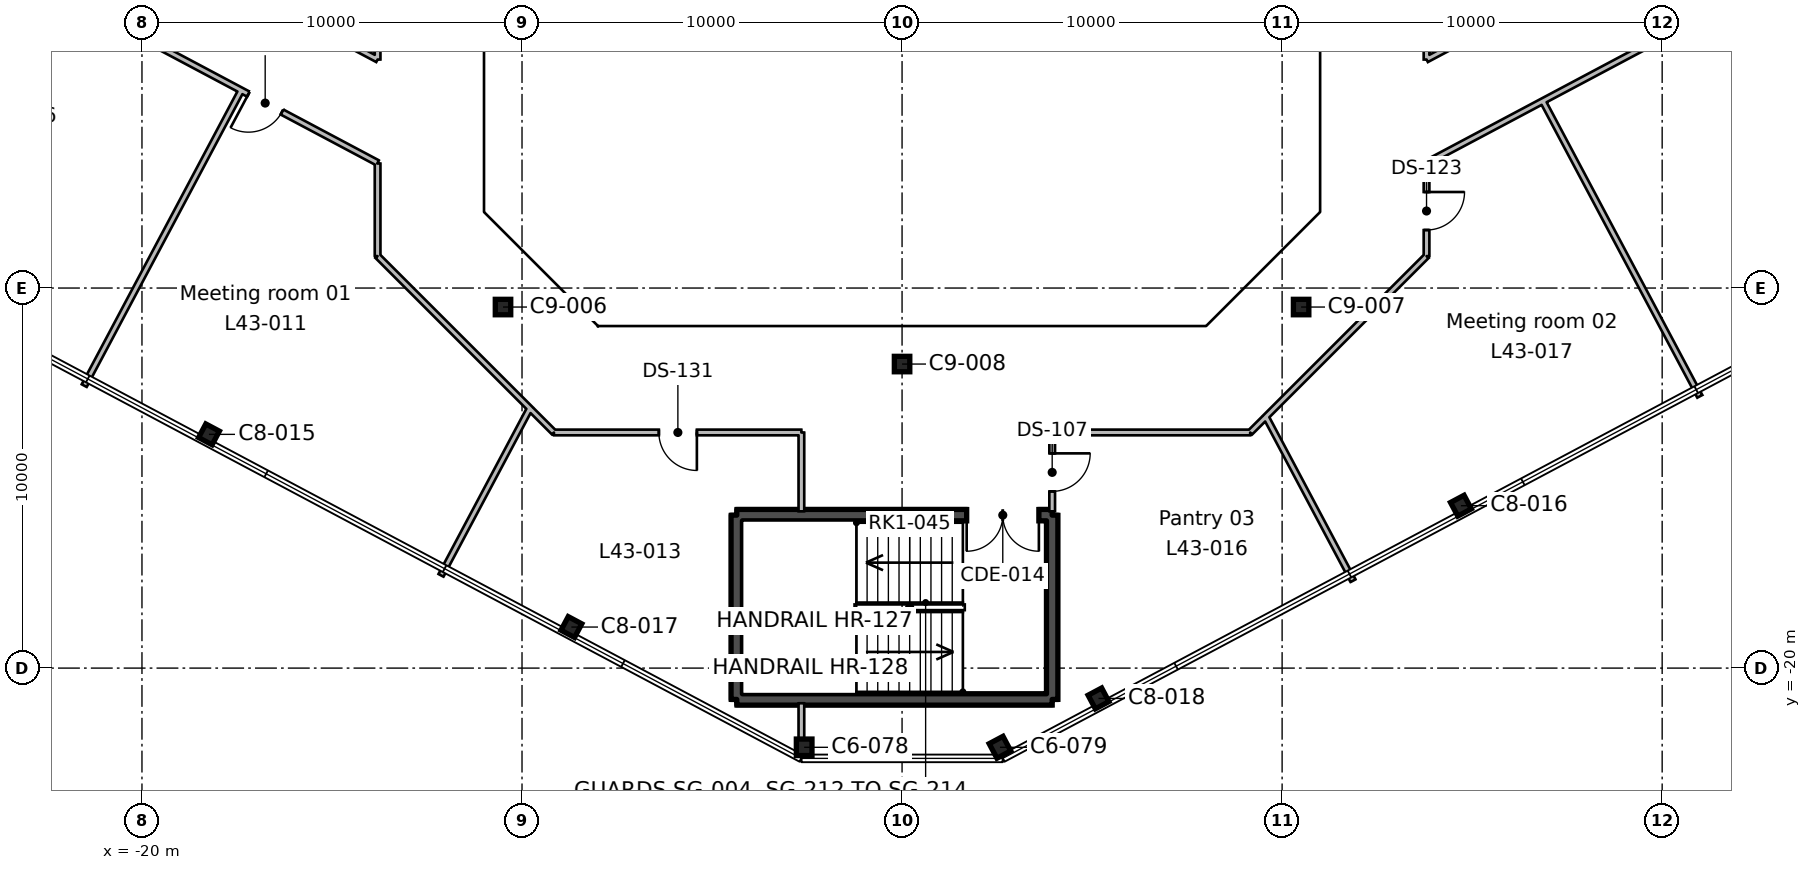
"""IFC4 building model, lengths in metres.
Left out: names, types, materials, properties, quantities, classifications, styles, units other than length and angle.
Written with IfcOpenShell. Run it as: python <this file> out.ifc"""

import sys

from ifc_helpers import new_model, si_unit, direction, frame, frame_2d, origin, origin_2d, place, context, subcontext, project, spatial, rectangle, hollow_rectangle, i_section, extrude, element, fill, save


model = new_model("IFC4")
c1 = context("Model", 3, precision=1e-05, world=origin(), true_north=direction((0.0, 1.0)))
c2 = subcontext(c1, "Body", "Model", "MODEL_VIEW")
j1 = project(units=[si_unit("LENGTHUNIT", "METRE"), si_unit("PLANEANGLEUNIT", "RADIAN")], contexts=[c1])
p1 = place(None, origin())
s1 = spatial("IfcSite", under=j1, at=p1, CompositionType="ELEMENT")
p2 = place(p1, origin())
s2 = spatial("IfcBuilding", under=s1, at=p2, CompositionType="ELEMENT")
p3 = place(p2, frame((0.0, 0.0, 201.3)))
s3 = spatial("IfcBuildingStorey", under=s2, at=p3, CompositionType="ELEMENT", Elevation=201.3)
for number, where, z_axis, x_axis in (
    (1, (-2.576, -22.084, 0.0), (0.0, 0.0, 1.0), (1.0, 0.0, 0.0)),
    (2, (2.576, -22.084, 0.0), (0.0, 0.0, 1.0), (0.883, 0.469, 0.0)),
):
    element("IfcColumn", number, at=place(p3, frame(where, z_axis=z_axis, x_axis=x_axis)), inside=s3, PredefinedType="COLUMN", context=c2, shape_type="SweptSolid", body=[
        extrude(i_section(OverallWidth=0.412, OverallDepth=0.434, WebThickness=0.036, FlangeThickness=0.057, FilletRadius=0.015, at=origin_2d()), origin(), (0.0, 0.0, 1.0), 3.9),
    ])
for number, where, z_axis, x_axis in (
    (3, (5.169, -20.798, 0.0), (0.0, 0.0, 1.0), (0.883, 0.469, 0.0)),
    (4, (-8.701, -18.92, 0.0), (0.0, 0.0, 1.0), (0.883, -0.469, 0.0)),
    (5, (14.705, -15.727, 0.0), (0.0, 0.0, 1.0), (0.883, 0.469, 0.0)),
    (6, (-18.237, -13.85, 0.0), (0.0, 0.0, 1.0), (0.883, -0.469, 0.0)),
):
    element("IfcColumn", number, at=place(p3, frame(where, z_axis=z_axis, x_axis=x_axis)), inside=s3, PredefinedType="COLUMN", context=c2, shape_type="SweptSolid", body=[
        extrude(i_section(OverallWidth=0.404, OverallDepth=0.406, WebThickness=0.027, FlangeThickness=0.044, FilletRadius=0.015, at=origin_2d()), origin(), (0.0, 0.0, 1.0), 3.9),
    ])
for number, where, z_axis, x_axis in (
    (7, (0.0, -12.0, 0.0), (0.0, 0.0, 1.0), (1.0, 0.0, 0.0)),
    (8, (-10.5, -10.5, 0.0), (0.0, 0.0, 1.0), (1.0, 0.0, 0.0)),
    (9, (10.5, -10.5, 0.0), (0.0, 0.0, 1.0), (1.0, 0.0, 0.0)),
):
    element("IfcColumn", number, at=place(p3, frame(where, z_axis=z_axis, x_axis=x_axis)), inside=s3, PredefinedType="COLUMN", context=c2, shape_type="SweptSolid", body=[
        extrude(hollow_rectangle(XDim=0.406, YDim=0.406, WallThickness=0.015, InnerFilletRadius=0.007, OuterFilletRadius=0.022, at=origin_2d()), origin(), (0.0, 0.0, 1.0), 3.9),
    ])
p4 = place(p3, frame((3.95, -15.975, 0.0), z_axis=(0.0, 0.0, 1.0), x_axis=(0.0, -1.0, 0.0)))
e10 = element("IfcWall", 10, at=p4, inside=s3, PredefinedType="SHEAR", context=c2, shape_type="SweptSolid", body=[
    extrude(rectangle(XDim=4.85, YDim=0.3, at=frame_2d((2.425, 0.0))), origin(), (0.0, 0.0, 1.0), 3.9),
])
p5 = place(p3, frame((3.95, -20.825, 0.0), z_axis=(0.0, 0.0, 1.0), x_axis=(-1.0, 0.0, 0.0)))
e11 = element("IfcWall", 11, at=p5, inside=s3, PredefinedType="SHEAR", context=c2, shape_type="SweptSolid", body=[
    extrude(rectangle(XDim=8.3, YDim=0.3, at=frame_2d((4.15, 0.0))), origin(), (0.0, 0.0, 1.0), 3.9),
])
p6 = place(p3, frame((-4.35, -20.825, 0.0), z_axis=(0.0, 0.0, 1.0), x_axis=(0.0, 1.0, 0.0)))
e12 = element("IfcWall", 12, at=p6, inside=s3, PredefinedType="SHEAR", context=c2, shape_type="SweptSolid", body=[
    extrude(rectangle(XDim=4.85, YDim=0.3, at=frame_2d((2.425, 0.0))), origin(), (0.0, 0.0, 1.0), 3.9),
])
p7 = place(p3, frame((-4.35, -15.975, 0.0), z_axis=(0.0, 0.0, 1.0), x_axis=(1.0, 0.0, 0.0)))
e13 = element("IfcWall", 13, at=p7, inside=s3, PredefinedType="SHEAR", context=c2, shape_type="SweptSolid", body=[
    extrude(rectangle(XDim=8.3, YDim=0.3, at=frame_2d((4.15, 0.0))), origin(), (0.0, 0.0, 1.0), 3.9),
])
p8 = place(p7, frame((6.05, 0.0, 0.0)))
e14 = element("IfcOpeningElement", 14, at=p8, cuts=e13, PredefinedType="OPENING", context=c2, shape_type="SweptSolid", body=[
    extrude(rectangle(XDim=1.9, YDim=2.1, at=frame_2d((0.95, 1.05))), frame((0.0, 0.16, 0.0), z_axis=(0.0, -1.0, 0.0), x_axis=(1.0, 0.0, 0.0)), (0.0, 0.0, 1.0), 0.32),
])
p9 = place(p3, frame((-13.8, -6.706, 0.0), z_axis=(0.0, 0.0, 1.0), x_axis=(-0.882947286887, 0.469472138235, 0.0)))
e15 = element("IfcWall", 15, at=p9, inside=s3, PredefinedType="PARTITIONING", context=c2, shape_type="SweptSolid", body=[
    extrude(rectangle(XDim=36.571, YDim=0.15, at=frame_2d((18.285, 0.0))), origin(), (0.0, 0.0, 1.0), 3.54),
])
p10 = place(p9, frame((34.15, 0.0, 0.0)))
e16 = element("IfcOpeningElement", 16, at=p10, cuts=e15, PredefinedType="OPENING", context=c2, shape_type="SweptSolid", body=[
    extrude(rectangle(XDim=1.0, YDim=2.1, at=frame_2d((0.5, 1.05))), frame((0.0, 0.085, 0.0), z_axis=(0.0, -1.0, 0.0), x_axis=(1.0, 0.0, 0.0)), (0.0, 0.0, 1.0), 0.17),
])
p11 = place(p9, frame((17.75, 0.0, 0.0)))
e17 = element("IfcOpeningElement", 17, at=p11, cuts=e15, PredefinedType="OPENING", context=c2, shape_type="SweptSolid", body=[
    extrude(rectangle(XDim=1.0, YDim=2.1, at=frame_2d((0.5, 1.05))), frame((0.0, 0.085, 0.0), z_axis=(0.0, -1.0, 0.0), x_axis=(1.0, 0.0, 0.0)), (0.0, 0.0, 1.0), 0.17),
])
p12 = place(p9, frame((13.45, 0.0, 0.0)))
e18 = element("IfcOpeningElement", 18, at=p12, cuts=e15, PredefinedType="OPENING", context=c2, shape_type="SweptSolid", body=[
    extrude(rectangle(XDim=1.0, YDim=2.1, at=frame_2d((0.5, 1.05))), frame((0.0, 0.085, 0.0), z_axis=(0.0, -1.0, 0.0), x_axis=(1.0, 0.0, 0.0)), (0.0, 0.0, 1.0), 0.17),
])
p13 = place(p9, frame((2.85, 0.0, 0.0)))
e19 = element("IfcOpeningElement", 19, at=p13, cuts=e15, PredefinedType="OPENING", context=c2, shape_type="SweptSolid", body=[
    extrude(rectangle(XDim=1.0, YDim=2.1, at=frame_2d((0.5, 1.05))), frame((0.0, 0.085, 0.0), z_axis=(0.0, -1.0, 0.0), x_axis=(1.0, 0.0, 0.0)), (0.0, 0.0, 1.0), 0.17),
])
p14 = place(p3, frame((-17.388, -4.798, 0.0), z_axis=(0.0, 0.0, 1.0), x_axis=(-0.469532456729, -0.882915212281, 0.0)))
e20 = element("IfcWall", 20, at=p14, inside=s3, PredefinedType="PARTITIONING", context=c2, shape_type="SweptSolid", body=[
    extrude(rectangle(XDim=8.8, YDim=0.15, at=frame_2d((4.4, 0.0))), origin(), (0.0, 0.0, 1.0), 3.54),
])
p15 = place(p3, frame((-9.759, -13.2, 0.0), z_axis=(0.0, 0.0, 1.0), x_axis=(-0.707192226993, 0.707021325053, 0.0)))
e21 = element("IfcWall", 21, at=p15, inside=s3, PredefinedType="PARTITIONING", context=c2, shape_type="SweptSolid", body=[
    extrude(rectangle(XDim=5.714, YDim=0.15, at=frame_2d((2.857, 0.0))), origin(), (0.0, 0.0, 1.0), 3.54),
])
p16 = place(p3, frame((-13.8, -9.16, 0.0), z_axis=(0.0, 0.0, 1.0), x_axis=(0.0, 1.0, 0.0)))
e22 = element("IfcWall", 22, at=p16, inside=s3, PredefinedType="PARTITIONING", context=c2, shape_type="SweptSolid", body=[
    extrude(rectangle(XDim=2.437, YDim=0.15, at=frame_2d((1.219, 0.0))), origin(), (0.0, 0.0, 1.0), 3.54),
])
p17 = place(p3, frame((-9.794, -13.165, 0.0), z_axis=(0.0, 0.0, 1.0), x_axis=(-0.469669090987, -0.882842536906, 0.0)))
e23 = element("IfcWall", 23, at=p17, inside=s3, PredefinedType="PARTITIONING", context=c2, shape_type="SweptSolid", body=[
    extrude(rectangle(XDim=4.978, YDim=0.15, at=frame_2d((2.489, 0.0))), origin(), (0.0, 0.0, 1.0), 3.54),
])
p18 = place(p3, frame((-2.649, -13.8, 0.0), z_axis=(0.0, 0.0, 1.0), x_axis=(-1.0, 0.0, 0.0)))
e24 = element("IfcWall", 24, at=p18, inside=s3, PredefinedType="PARTITIONING", context=c2, shape_type="SweptSolid", body=[
    extrude(rectangle(XDim=6.511, YDim=0.15, at=frame_2d((3.255, 0.0))), origin(), (0.0, 0.0, 1.0), 3.54),
])
p19 = place(p18, frame((2.75, 0.0, 0.0)))
e25 = element("IfcOpeningElement", 25, at=p19, cuts=e24, PredefinedType="OPENING", context=c2, shape_type="SweptSolid", body=[
    extrude(rectangle(XDim=1.0, YDim=2.1, at=frame_2d((0.5, 1.05))), frame((0.0, 0.085, 0.0), z_axis=(0.0, -1.0, 0.0), x_axis=(1.0, 0.0, 0.0)), (0.0, 0.0, 1.0), 0.17),
])
p20 = place(p3, frame((-9.791, -13.169, 0.0), z_axis=(0.0, 0.0, 1.0), x_axis=(0.707653231313, -0.706559908438, 0.0)))
e26 = element("IfcWall", 26, at=p20, inside=s3, PredefinedType="PARTITIONING", context=c2, shape_type="SweptSolid", body=[
    extrude(rectangle(XDim=0.893, YDim=0.15, at=frame_2d((0.447, 0.0))), origin(), (0.0, 0.0, 1.0), 3.54),
])
p21 = place(p3, frame((-2.649, -13.8, 0.0), z_axis=(0.0, 0.0, 1.0), x_axis=(0.0, -1.0, 0.0)))
e27 = element("IfcWall", 27, at=p21, inside=s3, PredefinedType="PARTITIONING", context=c2, shape_type="SweptSolid", body=[
    extrude(rectangle(XDim=2.075, YDim=0.15, at=frame_2d((1.038, 0.0))), origin(), (0.0, 0.0, 1.0), 3.54),
])
p22 = place(p3, frame((-2.649, -20.925, 0.0), z_axis=(0.0, 0.0, 1.0), x_axis=(0.0, -1.0, 0.0)))
e28 = element("IfcWall", 28, at=p22, inside=s3, PredefinedType="PARTITIONING", context=c2, shape_type="SweptSolid", body=[
    extrude(rectangle(XDim=0.942, YDim=0.15, at=frame_2d((0.471, 0.0))), origin(), (0.0, 0.0, 1.0), 3.54),
])
p23 = place(p3, frame((4.954, -13.8, 0.0), z_axis=(0.0, 0.0, 1.0), x_axis=(-1.0, 0.0, 0.0)))
e29 = element("IfcWall", 29, at=p23, inside=s3, PredefinedType="PARTITIONING", context=c2, shape_type="SweptSolid", body=[
    extrude(rectangle(XDim=1.004, YDim=0.15, at=frame_2d((0.502, 0.0))), origin(), (0.0, 0.0, 1.0), 3.54),
])
p24 = place(p3, frame((3.95, -13.8, 0.0), z_axis=(0.0, 0.0, 1.0), x_axis=(0.0, -1.0, 0.0)))
e30 = element("IfcWall", 30, at=p24, inside=s3, PredefinedType="PARTITIONING", context=c2, shape_type="SweptSolid", body=[
    extrude(rectangle(XDim=2.075, YDim=0.15, at=frame_2d((1.038, 0.0))), origin(), (0.0, 0.0, 1.0), 3.54),
])
p25 = place(p24, frame((0.55, 0.0, 0.0)))
e31 = element("IfcOpeningElement", 31, at=p25, cuts=e30, PredefinedType="OPENING", context=c2, shape_type="SweptSolid", body=[
    extrude(rectangle(XDim=1.0, YDim=2.1, at=frame_2d((0.5, 1.05))), frame((0.0, 0.085, 0.0), z_axis=(0.0, -1.0, 0.0), x_axis=(1.0, 0.0, 0.0)), (0.0, 0.0, 1.0), 0.17),
])
p26 = place(p3, frame((9.16, -13.8, 0.0), z_axis=(0.0, 0.0, 1.0), x_axis=(-1.0, 0.0, 0.0)))
e32 = element("IfcWall", 32, at=p26, inside=s3, PredefinedType="PARTITIONING", context=c2, shape_type="SweptSolid", body=[
    extrude(rectangle(XDim=4.206, YDim=0.15, at=frame_2d((2.103, 0.0))), origin(), (0.0, 0.0, 1.0), 3.54),
])
p27 = place(p3, frame((9.159, -13.8, 0.0), z_axis=(0.0, 0.0, 1.0), x_axis=(0.707945081169, 0.70626748619, 0.0)))
e33 = element("IfcWall", 33, at=p27, inside=s3, PredefinedType="PARTITIONING", context=c2, shape_type="SweptSolid", body=[
    extrude(rectangle(XDim=0.582, YDim=0.15, at=frame_2d((0.291, 0.0))), origin(), (0.0, 0.0, 1.0), 3.54),
])
p28 = place(p3, frame((9.573, -13.387, 0.0), z_axis=(0.0, 0.0, 1.0), x_axis=(0.469342774431, -0.883016058795, 0.0)))
e34 = element("IfcWall", 34, at=p28, inside=s3, PredefinedType="PARTITIONING", context=c2, shape_type="SweptSolid", body=[
    extrude(rectangle(XDim=4.885, YDim=0.15, at=frame_2d((2.443, 0.0))), origin(), (0.0, 0.0, 1.0), 3.54),
])
p29 = place(p3, frame((13.8, -6.723, 0.0), z_axis=(0.0, 0.0, 1.0), x_axis=(0.0, -1.0, 0.0)))
e35 = element("IfcWall", 35, at=p29, inside=s3, PredefinedType="PARTITIONING", context=c2, shape_type="SweptSolid", body=[
    extrude(rectangle(XDim=2.437, YDim=0.15, at=frame_2d((1.219, 0.0))), origin(), (0.0, 0.0, 1.0), 3.54),
])
p30 = place(p29, frame((0.75, 0.0, 0.0)))
e36 = element("IfcOpeningElement", 36, at=p30, cuts=e35, PredefinedType="OPENING", context=c2, shape_type="SweptSolid", body=[
    extrude(rectangle(XDim=1.0, YDim=2.1, at=frame_2d((0.5, 1.05))), frame((0.0, 0.085, 0.0), z_axis=(0.0, -1.0, 0.0), x_axis=(1.0, 0.0, 0.0)), (0.0, 0.0, 1.0), 0.17),
])
p31 = place(p3, frame((13.8, -9.16, 0.0), z_axis=(0.0, 0.0, 1.0), x_axis=(-0.707187736796, -0.707025816307, 0.0)))
e37 = element("IfcWall", 37, at=p31, inside=s3, PredefinedType="PARTITIONING", context=c2, shape_type="SweptSolid", body=[
    extrude(rectangle(XDim=6.031, YDim=0.15, at=frame_2d((3.016, 0.0))), origin(), (0.0, 0.0, 1.0), 3.54),
])
p32 = place(p3, frame((16.859, -5.08, 0.0), z_axis=(0.0, 0.0, 1.0), x_axis=(0.469445946219, -0.882961212952, 0.0)))
e38 = element("IfcWall", 38, at=p32, inside=s3, PredefinedType="PARTITIONING", context=c2, shape_type="SweptSolid", body=[
    extrude(rectangle(XDim=8.8, YDim=0.15, at=frame_2d((4.4, 0.0))), origin(), (0.0, 0.0, 1.0), 3.54),
])
p33 = place(p3, frame((48.38, 11.679, 0.0), z_axis=(0.0, 0.0, 1.0), x_axis=(-0.882962559816, -0.469443412951, 0.0)))
e39 = element("IfcWall", 39, at=p33, inside=s3, PredefinedType="PARTITIONING", context=c2, shape_type="SweptSolid", body=[
    extrude(rectangle(XDim=39.163, YDim=0.15, at=frame_2d((19.582, 0.0))), origin(), (0.0, 0.0, 1.0), 3.54),
])
p34 = place(p33, frame((25.55, 0.0, 0.0)))
e40 = element("IfcOpeningElement", 40, at=p34, cuts=e39, PredefinedType="OPENING", context=c2, shape_type="SweptSolid", body=[
    extrude(rectangle(XDim=1.0, YDim=2.1, at=frame_2d((0.5, 1.05))), frame((0.0, 0.085, 0.0), z_axis=(0.0, -1.0, 0.0), x_axis=(1.0, 0.0, 0.0)), (0.0, 0.0, 1.0), 0.17),
])
p35 = place(p33, frame((20.45, 0.0, 0.0)))
e41 = element("IfcOpeningElement", 41, at=p35, cuts=e39, PredefinedType="OPENING", context=c2, shape_type="SweptSolid", body=[
    extrude(rectangle(XDim=1.0, YDim=2.1, at=frame_2d((0.5, 1.05))), frame((0.0, 0.085, 0.0), z_axis=(0.0, -1.0, 0.0), x_axis=(1.0, 0.0, 0.0)), (0.0, 0.0, 1.0), 0.17),
])
p36 = place(p33, frame((18.75, 0.0, 0.0)))
e42 = element("IfcOpeningElement", 42, at=p36, cuts=e39, PredefinedType="OPENING", context=c2, shape_type="SweptSolid", body=[
    extrude(rectangle(XDim=1.0, YDim=2.1, at=frame_2d((0.5, 1.05))), frame((0.0, 0.085, 0.0), z_axis=(0.0, -1.0, 0.0), x_axis=(1.0, 0.0, 0.0)), (0.0, 0.0, 1.0), 0.17),
])
p37 = place(p3, frame((-13.8, 9.16, 0.0), z_axis=(0.0, 0.0, 1.0), x_axis=(0.0, -1.0, 0.0)))
e43 = element("IfcWall", 43, at=p37, inside=s3, PredefinedType="PARTITIONING", context=c2, shape_type="SweptSolid", body=[
    extrude(rectangle(XDim=13.148, YDim=0.15, at=frame_2d((6.574, 0.0))), origin(), (0.0, 0.0, 1.0), 3.54),
])
p38 = place(p3, frame((-13.8, -3.988, 0.0), z_axis=(0.0, 0.0, 1.0), x_axis=(-0.88294256459, 0.469481019461, 0.0)))
e44 = element("IfcWall", 44, at=p38, inside=s3, PredefinedType="PARTITIONING", context=c2, shape_type="SweptSolid", body=[
    extrude(rectangle(XDim=7.487, YDim=0.15, at=frame_2d((3.744, 0.0))), origin(), (0.0, 0.0, 1.0), 3.54),
])
p39 = place(p3, frame((13.8, 3.441, 0.0), z_axis=(0.0, 0.0, 1.0), x_axis=(0.0, -1.0, 0.0)))
e45 = element("IfcWall", 45, at=p39, inside=s3, PredefinedType="PARTITIONING", context=c2, shape_type="SweptSolid", body=[
    extrude(rectangle(XDim=7.429, YDim=0.15, at=frame_2d((3.714, 0.0))), origin(), (0.0, 0.0, 1.0), 3.54),
])
p40 = place(p3, frame((13.8, -3.988, 0.0), z_axis=(0.0, 0.0, 1.0), x_axis=(0.882958842974, 0.469450403786, 0.0)))
e46 = element("IfcWall", 46, at=p40, inside=s3, PredefinedType="PARTITIONING", context=c2, shape_type="SweptSolid", body=[
    extrude(rectangle(XDim=3.487, YDim=0.15, at=frame_2d((1.744, 0.0))), origin(), (0.0, 0.0, 1.0), 3.54),
])
p41 = place(p8, frame((1.9, 0.0, 0.0), z_axis=(0.0, 0.0, 1.0), x_axis=(-1.0, 0.0, 0.0)))
e47 = element("IfcDoor", 47, at=p41, inside=s3, OperationType="DOUBLE_DOOR_SINGLE_SWING", PredefinedType="DOOR", context=c2, shape_type="SweptSolid", body=[
    extrude(rectangle(XDim=1.9, YDim=2.1, at=frame_2d((0.95, 1.05))), frame((0.0, 0.025, 0.0), z_axis=(0.0, -1.0, 0.0), x_axis=(1.0, 0.0, 0.0)), (0.0, 0.0, 1.0), 0.05),
])
fill(e14, e47)
p42 = place(p25, origin())
e48 = element("IfcDoor", 48, at=p42, inside=s3, OperationType="SINGLE_SWING_LEFT", PredefinedType="DOOR", context=c2, shape_type="SweptSolid", body=[
    extrude(rectangle(XDim=1.0, YDim=2.1, at=frame_2d((0.5, 1.05))), frame((0.0, 0.025, 0.0), z_axis=(0.0, -1.0, 0.0), x_axis=(1.0, 0.0, 0.0)), (0.0, 0.0, 1.0), 0.05),
])
fill(e31, e48)
p43 = place(p30, origin())
e49 = element("IfcDoor", 49, at=p43, inside=s3, OperationType="SINGLE_SWING_LEFT", PredefinedType="DOOR", context=c2, shape_type="SweptSolid", body=[
    extrude(rectangle(XDim=1.0, YDim=2.1, at=frame_2d((0.5, 1.05))), frame((0.0, 0.025, 0.0), z_axis=(0.0, -1.0, 0.0), x_axis=(1.0, 0.0, 0.0)), (0.0, 0.0, 1.0), 0.05),
])
fill(e36, e49)
p44 = place(p13, origin())
e50 = element("IfcDoor", 50, at=p44, inside=s3, OperationType="SINGLE_SWING_RIGHT", PredefinedType="DOOR", context=c2, shape_type="SweptSolid", body=[
    extrude(rectangle(XDim=1.0, YDim=2.1, at=frame_2d((0.5, 1.05))), frame((0.0, 0.025, 0.0), z_axis=(0.0, -1.0, 0.0), x_axis=(1.0, 0.0, 0.0)), (0.0, 0.0, 1.0), 0.05),
])
fill(e19, e50)
p45 = place(p19, origin())
e51 = element("IfcDoor", 51, at=p45, inside=s3, OperationType="SINGLE_SWING_LEFT", PredefinedType="DOOR", context=c2, shape_type="SweptSolid", body=[
    extrude(rectangle(XDim=1.0, YDim=2.1, at=frame_2d((0.5, 1.05))), frame((0.0, 0.025, 0.0), z_axis=(0.0, -1.0, 0.0), x_axis=(1.0, 0.0, 0.0)), (0.0, 0.0, 1.0), 0.05),
])
fill(e25, e51)
save(model, sys.argv[1])
